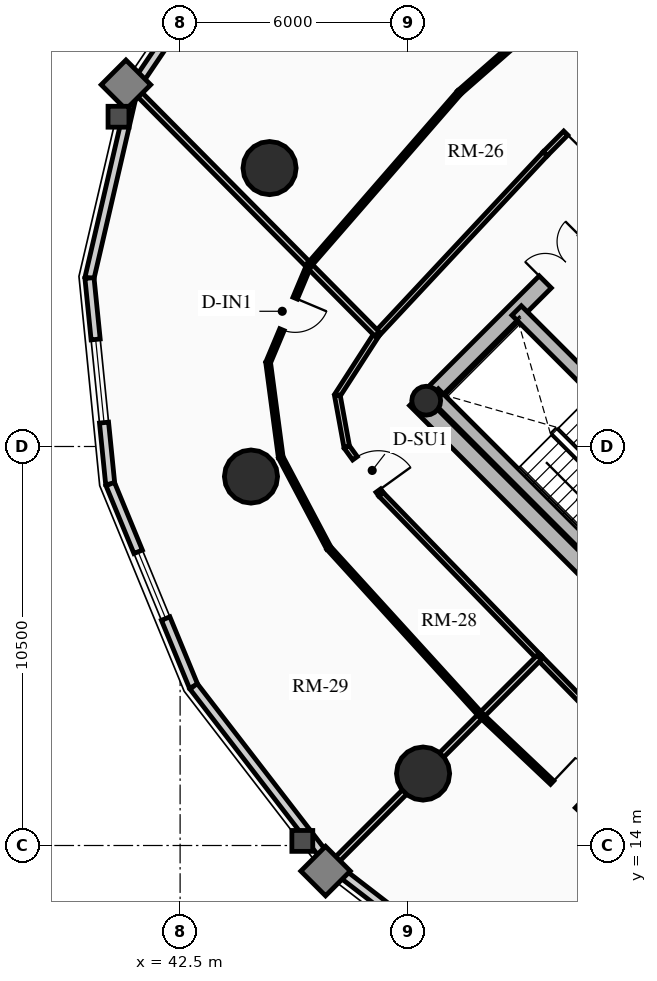
"""IFC4 building model, lengths in metres.
Left out: names, types, materials, properties, quantities, classifications, styles, units other than length and angle.
Written with IfcOpenShell. Run it as: python <this file> out.ifc"""

import sys

from ifc_helpers import new_model, si_unit, direction, frame, frame_2d, origin, origin_2d, place, context, subcontext, project, spatial, rectangle, circle, hollow_circle, extrude, source, transform, mapped, element, fill, save


model = new_model("IFC4")
c1 = context("Model", 3, precision=1e-05, world=origin(), true_north=direction((0.0, 1.0)))
c2 = subcontext(c1, "Body", "Model", "MODEL_VIEW")
j1 = project(units=[si_unit("LENGTHUNIT", "METRE"), si_unit("PLANEANGLEUNIT", "RADIAN")], contexts=[c1])
p1 = place(None, origin())
s1 = spatial("IfcSite", under=j1, at=p1, CompositionType="ELEMENT")
p2 = place(p1, origin())
s2 = spatial("IfcBuilding", under=s1, at=p2, CompositionType="ELEMENT")
p3 = place(p2, frame((0.0, 0.0, 93.43)))
s3 = spatial("IfcBuildingStorey", under=s2, at=p3, CompositionType="ELEMENT", Elevation=93.43)
p4 = place(p3, frame((58.737, 15.697, 0.0), z_axis=(0.0, 0.0, 1.0), x_axis=(-0.707106781187, 0.707106781187, 0.0)))
e1 = element("IfcWall", 1, at=p4, inside=s3, PredefinedType="SHEAR", context=c2, shape_type="SweptSolid", body=[
    extrude(rectangle(XDim=14.2, YDim=0.45, at=frame_2d((7.1, 0.0))), origin(), (0.0, 0.0, 1.0), 2.91),
])
p5 = place(p3, frame((48.856, 25.578, 0.0), z_axis=(0.0, 0.0, 1.0), x_axis=(0.707106781187, 0.707106781187, 0.0)))
e2 = element("IfcWall", 2, at=p5, inside=s3, PredefinedType="SHEAR", context=c2, shape_type="SweptSolid", body=[
    extrude(rectangle(XDim=10.7, YDim=0.45, at=frame_2d((5.35, 0.0))), origin(), (0.0, 0.0, 1.0), 2.91),
])
m1 = source(origin(), c2, "Body", "SweptSolid", [
    extrude(rectangle(XDim=1.5, YDim=2.02, at=frame_2d((0.75, 1.01))), frame((0.0, 0.235, 0.0), z_axis=(0.0, -1.0, 0.0), x_axis=(1.0, 0.0, 0.0)), (0.0, 0.0, 1.0), 0.47),
])
p6 = place(p5, frame((4.6, 0.0, 0.0)))
e3 = element("IfcOpeningElement", 3, at=p6, cuts=e2, PredefinedType="OPENING", context=c2, shape_type="MappedRepresentation", body=[
    mapped(m1, transform((0.0, 0.0, 0.0), x_axis=(1.0, 0.0, 0.0), y_axis=(0.0, 1.0, 0.0), z_axis=(0.0, 0.0, 1.0), scale=1.0)),
])
p7 = place(p3, frame((61.078, 18.355, 0.0), z_axis=(0.0, 0.0, 1.0), x_axis=(-0.707106781187, 0.707106781187, 0.0)))
e4 = element("IfcWall", 4, at=p7, inside=s3, PredefinedType="SHEAR", context=c2, shape_type="SweptSolid", body=[
    extrude(rectangle(XDim=13.75, YDim=0.35, at=frame_2d((6.875, 0.0))), origin(), (0.0, 0.0, 1.0), 2.91),
])
m2 = source(origin(), c2, "Body", "SweptSolid", [
    extrude(rectangle(XDim=1.1, YDim=2.015, at=frame_2d((0.55, 1.007))), frame((0.0, 0.185, 0.0), z_axis=(0.0, -1.0, 0.0), x_axis=(1.0, 0.0, 0.0)), (0.0, 0.0, 1.0), 0.37),
])
p8 = place(p7, frame((4.875, 0.0, 0.0)))
e5 = element("IfcOpeningElement", 5, at=p8, cuts=e4, PredefinedType="OPENING", context=c2, shape_type="MappedRepresentation", body=[
    mapped(m2, transform((0.0, 0.0, 0.0), x_axis=(1.0, 0.0, 0.0), y_axis=(0.0, 1.0, 0.0), z_axis=(0.0, 0.0, 1.0), scale=1.0)),
])
m3 = source(origin(), c2, "Body", "SweptSolid", [
    extrude(rectangle(XDim=1.15, YDim=2.02, at=frame_2d((0.575, 1.01))), frame((0.0, 0.185, 0.0), z_axis=(0.0, -1.0, 0.0), x_axis=(1.0, 0.0, 0.0)), (0.0, 0.0, 1.0), 0.37),
])
p9 = place(p7, frame((7.295, 0.0, 0.0)))
e6 = element("IfcOpeningElement", 6, at=p9, cuts=e4, PredefinedType="OPENING", context=c2, shape_type="MappedRepresentation", body=[
    mapped(m3, transform((0.0, 0.0, 0.0), x_axis=(1.0, 0.0, 0.0), y_axis=(0.0, 1.0, 0.0), z_axis=(0.0, 0.0, 1.0), scale=1.0)),
])
p10 = place(p3, frame((53.922, 21.141, 0.0), z_axis=(0.0, 0.0, 1.0), x_axis=(-0.707088616009, 0.707124945897, 0.0)))
e7 = element("IfcWall", 7, at=p10, inside=s3, PredefinedType="SHEAR", context=c2, shape_type="SweptSolid", body=[
    extrude(rectangle(XDim=6.72, YDim=0.35, at=frame_2d((3.36, 0.0))), origin(), (0.0, 0.0, 1.0), 2.91),
])
p11 = place(p3, frame((48.976, 25.706, 0.0), z_axis=(0.0, 0.0, 1.0), x_axis=(0.707106781187, 0.707106781187, 0.0)))
e8 = element("IfcColumn", 8, at=p11, inside=s3, PredefinedType="COLUMN", context=c2, shape_type="SweptSolid", body=[
    extrude(hollow_circle(Radius=0.38, WallThickness=0.032, at=origin_2d()), origin(), (0.0, 0.0, 1.0), 2.91),
])
for number, where, z_axis, x_axis in (
    (9, (44.854, 31.827, 0.0), (0.0, 0.0, 1.0), (1.0, 0.0, 0.0)),
    (10, (44.365, 23.709, 0.0), (0.0, 0.0, 1.0), (1.0, 0.0, 0.0)),
    (11, (48.893, 15.893, 0.0), (0.0, 0.0, 1.0), (1.0, 0.0, 0.0)),
):
    element("IfcColumn", number, at=place(p3, frame(where, z_axis=z_axis, x_axis=x_axis)), inside=s3, PredefinedType="USERDEFINED", context=c2, shape_type="SweptSolid", body=[
        extrude(circle(Radius=0.7, at=origin_2d()), origin(), (0.0, 0.0, 1.0), 2.91),
    ])
p12 = place(p3, frame((41.271, 33.92, 0.0), z_axis=(0.0, 0.0, 1.0), x_axis=(0.559572880421, 0.828781148131, 0.0)))
e12 = element("IfcWall", 12, at=p12, inside=s3, PredefinedType="SOLIDWALL", context=c2, shape_type="SweptSolid", body=[
    extrude(rectangle(XDim=4.905, YDim=0.24, at=frame_2d((2.452, 0.0))), origin(), (0.0, 0.0, 1.0), 2.179),
])
m4 = source(origin(), c2, "Body", "SweptSolid", [
    extrude(rectangle(XDim=1.9, YDim=1.35, at=frame_2d((0.95, 0.675))), frame((0.0, 0.13, 0.0), z_axis=(0.0, -1.0, 0.0), x_axis=(1.0, 0.0, 0.0)), (0.0, 0.0, 1.0), 0.26),
])
p13 = place(p12, frame((1.502, 0.0, 0.65)))
e13 = element("IfcOpeningElement", 13, at=p13, cuts=e12, PredefinedType="OPENING", context=c2, shape_type="MappedRepresentation", body=[
    mapped(m4, transform((0.0, 0.0, 0.0), x_axis=(1.0, 0.0, 0.0), y_axis=(0.0, 1.0, 0.0), z_axis=(0.0, 0.0, 1.0), scale=1.0)),
])
p14 = place(p3, frame((40.115, 28.933, 0.0), z_axis=(0.0, 0.0, 1.0), x_axis=(0.225834725257, 0.974165631126, 0.0)))
e14 = element("IfcWall", 14, at=p14, inside=s3, PredefinedType="SOLIDWALL", context=c2, shape_type="SweptSolid", body=[
    extrude(rectangle(XDim=5.119, YDim=0.24, at=frame_2d((2.56, 0.0))), origin(), (0.0, 0.0, 1.0), 2.179),
])
p15 = place(p3, frame((40.661, 23.513, 0.0), z_axis=(0.0, 0.0, 1.0), x_axis=(-0.10015591906, 0.994971754311, 0.0)))
e15 = element("IfcWall", 15, at=p15, inside=s3, PredefinedType="SOLIDWALL", context=c2, shape_type="SweptSolid", body=[
    extrude(rectangle(XDim=5.448, YDim=0.24, at=frame_2d((2.724, 0.0))), origin(), (0.0, 0.0, 1.0), 2.179),
])
m5 = source(origin(), c2, "Body", "SweptSolid", [
    extrude(rectangle(XDim=2.2, YDim=1.35, at=frame_2d((1.1, 0.675))), frame((0.0, 0.13, 0.0), z_axis=(0.0, -1.0, 0.0), x_axis=(1.0, 0.0, 0.0)), (0.0, 0.0, 1.0), 0.26),
])
p16 = place(p15, frame((1.624, 0.0, 0.65)))
e16 = element("IfcOpeningElement", 16, at=p16, cuts=e15, PredefinedType="OPENING", context=c2, shape_type="MappedRepresentation", body=[
    mapped(m5, transform((0.0, 0.0, 0.0), x_axis=(1.0, 0.0, 0.0), y_axis=(0.0, 1.0, 0.0), z_axis=(0.0, 0.0, 1.0), scale=1.0)),
])
p17 = place(p3, frame((42.855, 18.189, 0.0), z_axis=(0.0, 0.0, 1.0), x_axis=(-0.381027003055, 0.924563909604, 0.0)))
e17 = element("IfcWall", 17, at=p17, inside=s3, PredefinedType="SOLIDWALL", context=c2, shape_type="SweptSolid", body=[
    extrude(rectangle(XDim=5.758, YDim=0.24, at=frame_2d((2.879, 0.0))), origin(), (0.0, 0.0, 1.0), 2.179),
])
p18 = place(p17, frame((1.929, 0.0, 0.65)))
e18 = element("IfcOpeningElement", 18, at=p18, cuts=e17, PredefinedType="OPENING", context=c2, shape_type="MappedRepresentation", body=[
    mapped(m4, transform((0.0, 0.0, 0.0), x_axis=(1.0, 0.0, 0.0), y_axis=(0.0, 1.0, 0.0), z_axis=(0.0, 0.0, 1.0), scale=1.0)),
])
p19 = place(p3, frame((46.483, 13.483, 0.0), z_axis=(0.0, 0.0, 1.0), x_axis=(-0.61054437102, 0.791982052206, 0.0)))
e19 = element("IfcWall", 19, at=p19, inside=s3, PredefinedType="SOLIDWALL", context=c2, shape_type="SweptSolid", body=[
    extrude(rectangle(XDim=5.942, YDim=0.24, at=frame_2d((2.971, 0.0))), origin(), (0.0, 0.0, 1.0), 2.179),
])
p20 = place(p3, frame((51.189, 9.855, 0.0), z_axis=(0.0, 0.0, 1.0), x_axis=(-0.791982052206, 0.61054437102, 0.0)))
e20 = element("IfcWall", 20, at=p20, inside=s3, PredefinedType="SOLIDWALL", context=c2, shape_type="SweptSolid", body=[
    extrude(rectangle(XDim=5.942, YDim=0.24, at=frame_2d((2.971, 0.0))), origin(), (0.0, 0.0, 1.0), 2.179),
])
p21 = place(p20, frame((1.871, 0.0, 0.65)))
e21 = element("IfcOpeningElement", 21, at=p21, cuts=e20, PredefinedType="OPENING", context=c2, shape_type="MappedRepresentation", body=[
    mapped(m5, transform((0.0, 0.0, 0.0), x_axis=(1.0, 0.0, 0.0), y_axis=(0.0, 1.0, 0.0), z_axis=(0.0, 0.0, 1.0), scale=1.0)),
])
p22 = place(p3, frame((54.475, 34.591, 0.0), z_axis=(0.0, 0.0, 1.0), x_axis=(-0.703869646439, -0.710329163714, 0.0)))
e22 = element("IfcWall", 22, at=p22, inside=s3, PredefinedType="PARTITIONING", context=c2, shape_type="SweptSolid", body=[
    extrude(rectangle(XDim=3.364, YDim=0.15, at=frame_2d((1.682, 0.0))), origin(), (0.0, 0.0, 1.0), 2.225),
])
m6 = source(origin(), c2, "Body", "SweptSolid", [
    extrude(rectangle(XDim=1.05, YDim=2.015, at=frame_2d((0.525, 1.007))), frame((0.0, 0.085, 0.0), z_axis=(0.0, -1.0, 0.0), x_axis=(1.0, 0.0, 0.0)), (0.0, 0.0, 1.0), 0.17),
])
p23 = place(p22, frame((1.546, 0.0, 0.0)))
e23 = element("IfcOpeningElement", 23, at=p23, cuts=e22, PredefinedType="OPENING", context=c2, shape_type="MappedRepresentation", body=[
    mapped(m6, transform((0.0, 0.0, 0.0), x_axis=(1.0, 0.0, 0.0), y_axis=(0.0, 1.0, 0.0), z_axis=(0.0, 0.0, 1.0), scale=1.0)),
])
p24 = place(p3, frame((52.107, 32.202, 0.0), z_axis=(0.0, 0.0, 1.0), x_axis=(-0.682605209028, -0.730787334734, 0.0)))
e24 = element("IfcWall", 24, at=p24, inside=s3, PredefinedType="PARTITIONING", context=c2, shape_type="SweptSolid", body=[
    extrude(rectangle(XDim=6.486, YDim=0.15, at=frame_2d((3.243, 0.0))), origin(), (0.0, 0.0, 1.0), 2.225),
])
p25 = place(p3, frame((47.68, 27.462, 0.0), z_axis=(0.0, 0.0, 1.0), x_axis=(-0.542097952486, -0.840315303865, 0.0)))
e25 = element("IfcWall", 25, at=p25, inside=s3, PredefinedType="PARTITIONING", context=c2, shape_type="SweptSolid", body=[
    extrude(rectangle(XDim=1.923, YDim=0.15, at=frame_2d((0.961, 0.0))), origin(), (0.0, 0.0, 1.0), 2.225),
])
p26 = place(p3, frame((46.637, 25.846, 0.0), z_axis=(0.0, 0.0, 1.0), x_axis=(0.179617307107, -0.983736561782, 0.0)))
e26 = element("IfcWall", 26, at=p26, inside=s3, PredefinedType="PARTITIONING", context=c2, shape_type="SweptSolid", body=[
    extrude(rectangle(XDim=1.38, YDim=0.15, at=frame_2d((0.69, 0.0))), origin(), (0.0, 0.0, 1.0), 2.225),
])
p27 = place(p3, frame((46.885, 24.489, 0.0), z_axis=(0.0, 0.0, 1.0), x_axis=(0.585716430945, -0.810516047047, 0.0)))
e27 = element("IfcWall", 27, at=p27, inside=s3, PredefinedType="PARTITIONING", context=c2, shape_type="SweptSolid", body=[
    extrude(rectangle(XDim=1.539, YDim=0.15, at=frame_2d((0.77, 0.0))), origin(), (0.0, 0.0, 1.0), 2.225),
])
p28 = place(p27, frame((0.369, 0.0, 0.0)))
e28 = element("IfcOpeningElement", 28, at=p28, cuts=e27, PredefinedType="OPENING", context=c2, shape_type="MappedRepresentation", body=[
    mapped(m6, transform((0.0, 0.0, 0.0), x_axis=(1.0, 0.0, 0.0), y_axis=(0.0, 1.0, 0.0), z_axis=(0.0, 0.0, 1.0), scale=1.0)),
])
p29 = place(p3, frame((47.786, 23.242, 0.0), z_axis=(0.0, 0.0, 1.0), x_axis=(0.696183456981, -0.717863910659, 0.0)))
e29 = element("IfcWall", 29, at=p29, inside=s3, PredefinedType="PARTITIONING", context=c2, shape_type="SweptSolid", body=[
    extrude(rectangle(XDim=5.979, YDim=0.15, at=frame_2d((2.99, 0.0))), origin(), (0.0, 0.0, 1.0), 2.655),
])
p30 = place(p3, frame((51.949, 18.949, 0.0), z_axis=(0.0, 0.0, 1.0), x_axis=(0.699801520154, -0.714337337951, 0.0)))
e30 = element("IfcWall", 30, at=p30, inside=s3, PredefinedType="PARTITIONING", context=c2, shape_type="SweptSolid", body=[
    extrude(rectangle(XDim=6.097, YDim=0.15, at=frame_2d((3.048, 0.0))), origin(), (0.0, 0.0, 1.0), 2.225),
])
p31 = place(p3, frame((47.68, 27.462, 0.0), z_axis=(0.0, 0.0, 1.0), x_axis=(-0.703913074907, 0.710286127539, 0.0)))
e31 = element("IfcWall", 31, at=p31, inside=s3, PredefinedType="PARTITIONING", context=c2, shape_type="SweptSolid", body=[
    extrude(rectangle(XDim=9.079, YDim=0.16, at=frame_2d((4.54, 0.0))), origin(), (0.0, 0.0, 1.0), 2.179),
])
p32 = place(p3, frame((51.949, 18.949, 0.0), z_axis=(0.0, 0.0, 1.0), x_axis=(-0.707106781187, -0.707106781187, 0.0)))
e32 = element("IfcWall", 32, at=p32, inside=s3, PredefinedType="PARTITIONING", context=c2, shape_type="SweptSolid", body=[
    extrude(rectangle(XDim=7.711, YDim=0.16, at=frame_2d((3.855, 0.0))), origin(), (0.0, 0.0, 1.0), 2.179),
])
p33 = place(p3, frame((52.687, 36.305, 0.0), z_axis=(0.0, 0.0, 1.0), x_axis=(-0.752332345919, -0.658783759123, 0.0)))
e33 = element("IfcWall", 33, at=p33, inside=s3, PredefinedType="PARTITIONING", context=c2, shape_type="SweptSolid", body=[
    extrude(rectangle(XDim=3.776, YDim=0.125, at=frame_2d((1.888, 0.0))), origin(), (0.0, 0.0, 1.0), 2.225),
])
p34 = place(p3, frame((49.845, 33.817, 0.0), z_axis=(0.0, 0.0, 1.0), x_axis=(-0.656101508867, -0.754672650931, 0.0)))
e34 = element("IfcWall", 34, at=p34, inside=s3, PredefinedType="PARTITIONING", context=c2, shape_type="SweptSolid", body=[
    extrude(rectangle(XDim=6.029, YDim=0.125, at=frame_2d((3.014, 0.0))), origin(), (0.0, 0.0, 1.0), 2.225),
])
p35 = place(p3, frame((45.89, 29.268, 0.0), z_axis=(0.0, 0.0, 1.0), x_axis=(-0.387057419757, -0.922055613188, 0.0)))
e35 = element("IfcWall", 35, at=p35, inside=s3, PredefinedType="PARTITIONING", context=c2, shape_type="SweptSolid", body=[
    extrude(rectangle(XDim=2.774, YDim=0.125, at=frame_2d((1.387, 0.0))), origin(), (0.0, 0.0, 1.0), 2.225),
])
m7 = source(origin(), c2, "Body", "SweptSolid", [
    extrude(rectangle(XDim=0.9, YDim=2.005, at=frame_2d((0.45, 1.002))), frame((0.0, 0.073, 0.0), z_axis=(0.0, -1.0, 0.0), x_axis=(1.0, 0.0, 0.0)), (0.0, 0.0, 1.0), 0.145),
])
p36 = place(p35, frame((0.937, 0.0, 0.0)))
e36 = element("IfcOpeningElement", 36, at=p36, cuts=e35, PredefinedType="OPENING", context=c2, shape_type="MappedRepresentation", body=[
    mapped(m7, transform((0.0, 0.0, 0.0), x_axis=(1.0, 0.0, 0.0), y_axis=(0.0, 1.0, 0.0), z_axis=(0.0, 0.0, 1.0), scale=1.0)),
])
p37 = place(p3, frame((44.816, 26.71, 0.0), z_axis=(0.0, 0.0, 1.0), x_axis=(0.131724981355, -0.991286300363, 0.0)))
e37 = element("IfcWall", 37, at=p37, inside=s3, PredefinedType="PARTITIONING", context=c2, shape_type="SweptSolid", body=[
    extrude(rectangle(XDim=2.515, YDim=0.125, at=frame_2d((1.258, 0.0))), origin(), (0.0, 0.0, 1.0), 2.655),
])
p38 = place(p3, frame((45.148, 24.217, 0.0), z_axis=(0.0, 0.0, 1.0), x_axis=(0.46760107134, -0.883939612237, 0.0)))
e38 = element("IfcWall", 38, at=p38, inside=s3, PredefinedType="PARTITIONING", context=c2, shape_type="SweptSolid", body=[
    extrude(rectangle(XDim=2.7, YDim=0.125, at=frame_2d((1.35, 0.0))), origin(), (0.0, 0.0, 1.0), 2.225),
])
p39 = place(p3, frame((46.41, 21.83, 0.0), z_axis=(0.0, 0.0, 1.0), x_axis=(0.6732109009, -0.739450527696, 0.0)))
e39 = element("IfcWall", 39, at=p39, inside=s3, PredefinedType="PARTITIONING", context=c2, shape_type="SweptSolid", body=[
    extrude(rectangle(XDim=5.96, YDim=0.125, at=frame_2d((2.98, 0.0))), origin(), (0.0, 0.0, 1.0), 2.655),
])
p40 = place(p3, frame((50.423, 17.423, 0.0), z_axis=(0.0, 0.0, 1.0), x_axis=(0.726497320663, -0.68716929724, 0.0)))
e40 = element("IfcWall", 40, at=p40, inside=s3, PredefinedType="PARTITIONING", context=c2, shape_type="SweptSolid", body=[
    extrude(rectangle(XDim=6.04, YDim=0.125, at=frame_2d((3.02, 0.0))), origin(), (0.0, 0.0, 1.0), 2.225),
])
p41 = place(p40, frame((2.57, 0.0, 0.0)))
e41 = element("IfcOpeningElement", 41, at=p41, cuts=e40, PredefinedType="OPENING", context=c2, shape_type="MappedRepresentation", body=[
    mapped(m7, transform((0.0, 0.0, 0.0), x_axis=(1.0, 0.0, 0.0), y_axis=(0.0, 1.0, 0.0), z_axis=(0.0, 0.0, 1.0), scale=1.0)),
])
m8 = source(origin(), c2, "Body", "SweptSolid", [
    extrude(rectangle(XDim=2.2, YDim=1.35, at=frame_2d((1.1, 0.675))), frame((0.0, 0.03, 0.0), z_axis=(0.0, -1.0, 0.0), x_axis=(1.0, 0.0, 0.0)), (0.0, 0.0, 1.0), 0.06),
])
p42 = place(p16, origin())
e42 = element("IfcWindow", 42, at=p42, inside=s3, PartitioningType="DOUBLE_PANEL_VERTICAL", PredefinedType="WINDOW", context=c2, shape_type="MappedRepresentation", body=[
    mapped(m8, transform((0.0, 0.0, 0.0), x_axis=(1.0, 0.0, 0.0), y_axis=(0.0, 1.0, 0.0), z_axis=(0.0, 0.0, 1.0), scale=1.0)),
])
fill(e16, e42)
m9 = source(origin(), c2, "Body", "SweptSolid", [
    extrude(rectangle(XDim=1.9, YDim=1.35, at=frame_2d((0.95, 0.675))), frame((0.0, 0.03, 0.0), z_axis=(0.0, -1.0, 0.0), x_axis=(1.0, 0.0, 0.0)), (0.0, 0.0, 1.0), 0.06),
])
p43 = place(p18, origin())
e43 = element("IfcWindow", 43, at=p43, inside=s3, PartitioningType="DOUBLE_PANEL_VERTICAL", PredefinedType="WINDOW", context=c2, shape_type="MappedRepresentation", body=[
    mapped(m9, transform((0.0, 0.0, 0.0), x_axis=(1.0, 0.0, 0.0), y_axis=(0.0, 1.0, 0.0), z_axis=(0.0, 0.0, 1.0), scale=1.0)),
])
fill(e18, e43)
m10 = source(origin(), c2, "Body", "SweptSolid", [
    extrude(rectangle(XDim=1.5, YDim=2.02, at=frame_2d((0.75, 1.01))), frame((0.0, 0.025, 0.0), z_axis=(0.0, -1.0, 0.0), x_axis=(1.0, 0.0, 0.0)), (0.0, 0.0, 1.0), 0.05),
])
p44 = place(p6, origin())
e44 = element("IfcDoor", 44, at=p44, inside=s3, OperationType="DOUBLE_DOOR_SINGLE_SWING", PredefinedType="DOOR", context=c2, shape_type="MappedRepresentation", body=[
    mapped(m10, transform((0.0, 0.0, 0.0), x_axis=(1.0, 0.0, 0.0), y_axis=(0.0, 1.0, 0.0), z_axis=(0.0, 0.0, 1.0), scale=1.0)),
])
fill(e3, e44)
m11 = source(origin(), c2, "Body", "SweptSolid", [
    extrude(rectangle(XDim=1.05, YDim=2.015, at=frame_2d((0.525, 1.007))), frame((0.0, 0.025, 0.0), z_axis=(0.0, -1.0, 0.0), x_axis=(1.0, 0.0, 0.0)), (0.0, 0.0, 1.0), 0.05),
])
p45 = place(p23, origin())
e45 = element("IfcDoor", 45, at=p45, inside=s3, OperationType="SINGLE_SWING_RIGHT", PredefinedType="DOOR", context=c2, shape_type="MappedRepresentation", body=[
    mapped(m11, transform((0.0, 0.0, 0.0), x_axis=(1.0, 0.0, 0.0), y_axis=(0.0, 1.0, 0.0), z_axis=(0.0, 0.0, 1.0), scale=1.0)),
])
fill(e23, e45)
p46 = place(p28, origin())
e46 = element("IfcDoor", 46, at=p46, inside=s3, OperationType="SINGLE_SWING_RIGHT", PredefinedType="DOOR", context=c2, shape_type="MappedRepresentation", body=[
    mapped(m11, transform((0.0, 0.0, 0.0), x_axis=(1.0, 0.0, 0.0), y_axis=(0.0, 1.0, 0.0), z_axis=(0.0, 0.0, 1.0), scale=1.0)),
])
fill(e28, e46)
m12 = source(origin(), c2, "Body", "SweptSolid", [
    extrude(rectangle(XDim=0.9, YDim=2.005, at=frame_2d((0.45, 1.002))), frame((0.0, 0.025, 0.0), z_axis=(0.0, -1.0, 0.0), x_axis=(1.0, 0.0, 0.0)), (0.0, 0.0, 1.0), 0.05),
])
p47 = place(p36, origin())
e47 = element("IfcDoor", 47, at=p47, inside=s3, OperationType="SINGLE_SWING_LEFT", PredefinedType="DOOR", context=c2, shape_type="MappedRepresentation", body=[
    mapped(m12, transform((0.0, 0.0, 0.0), x_axis=(1.0, 0.0, 0.0), y_axis=(0.0, 1.0, 0.0), z_axis=(0.0, 0.0, 1.0), scale=1.0)),
])
fill(e36, e47)
p48 = place(p41, origin())
e48 = element("IfcDoor", 48, at=p48, inside=s3, OperationType="SINGLE_SWING_LEFT", PredefinedType="DOOR", context=c2, shape_type="MappedRepresentation", body=[
    mapped(m12, transform((0.0, 0.0, 0.0), x_axis=(1.0, 0.0, 0.0), y_axis=(0.0, 1.0, 0.0), z_axis=(0.0, 0.0, 1.0), scale=1.0)),
])
fill(e41, e48)
save(model, sys.argv[1])
